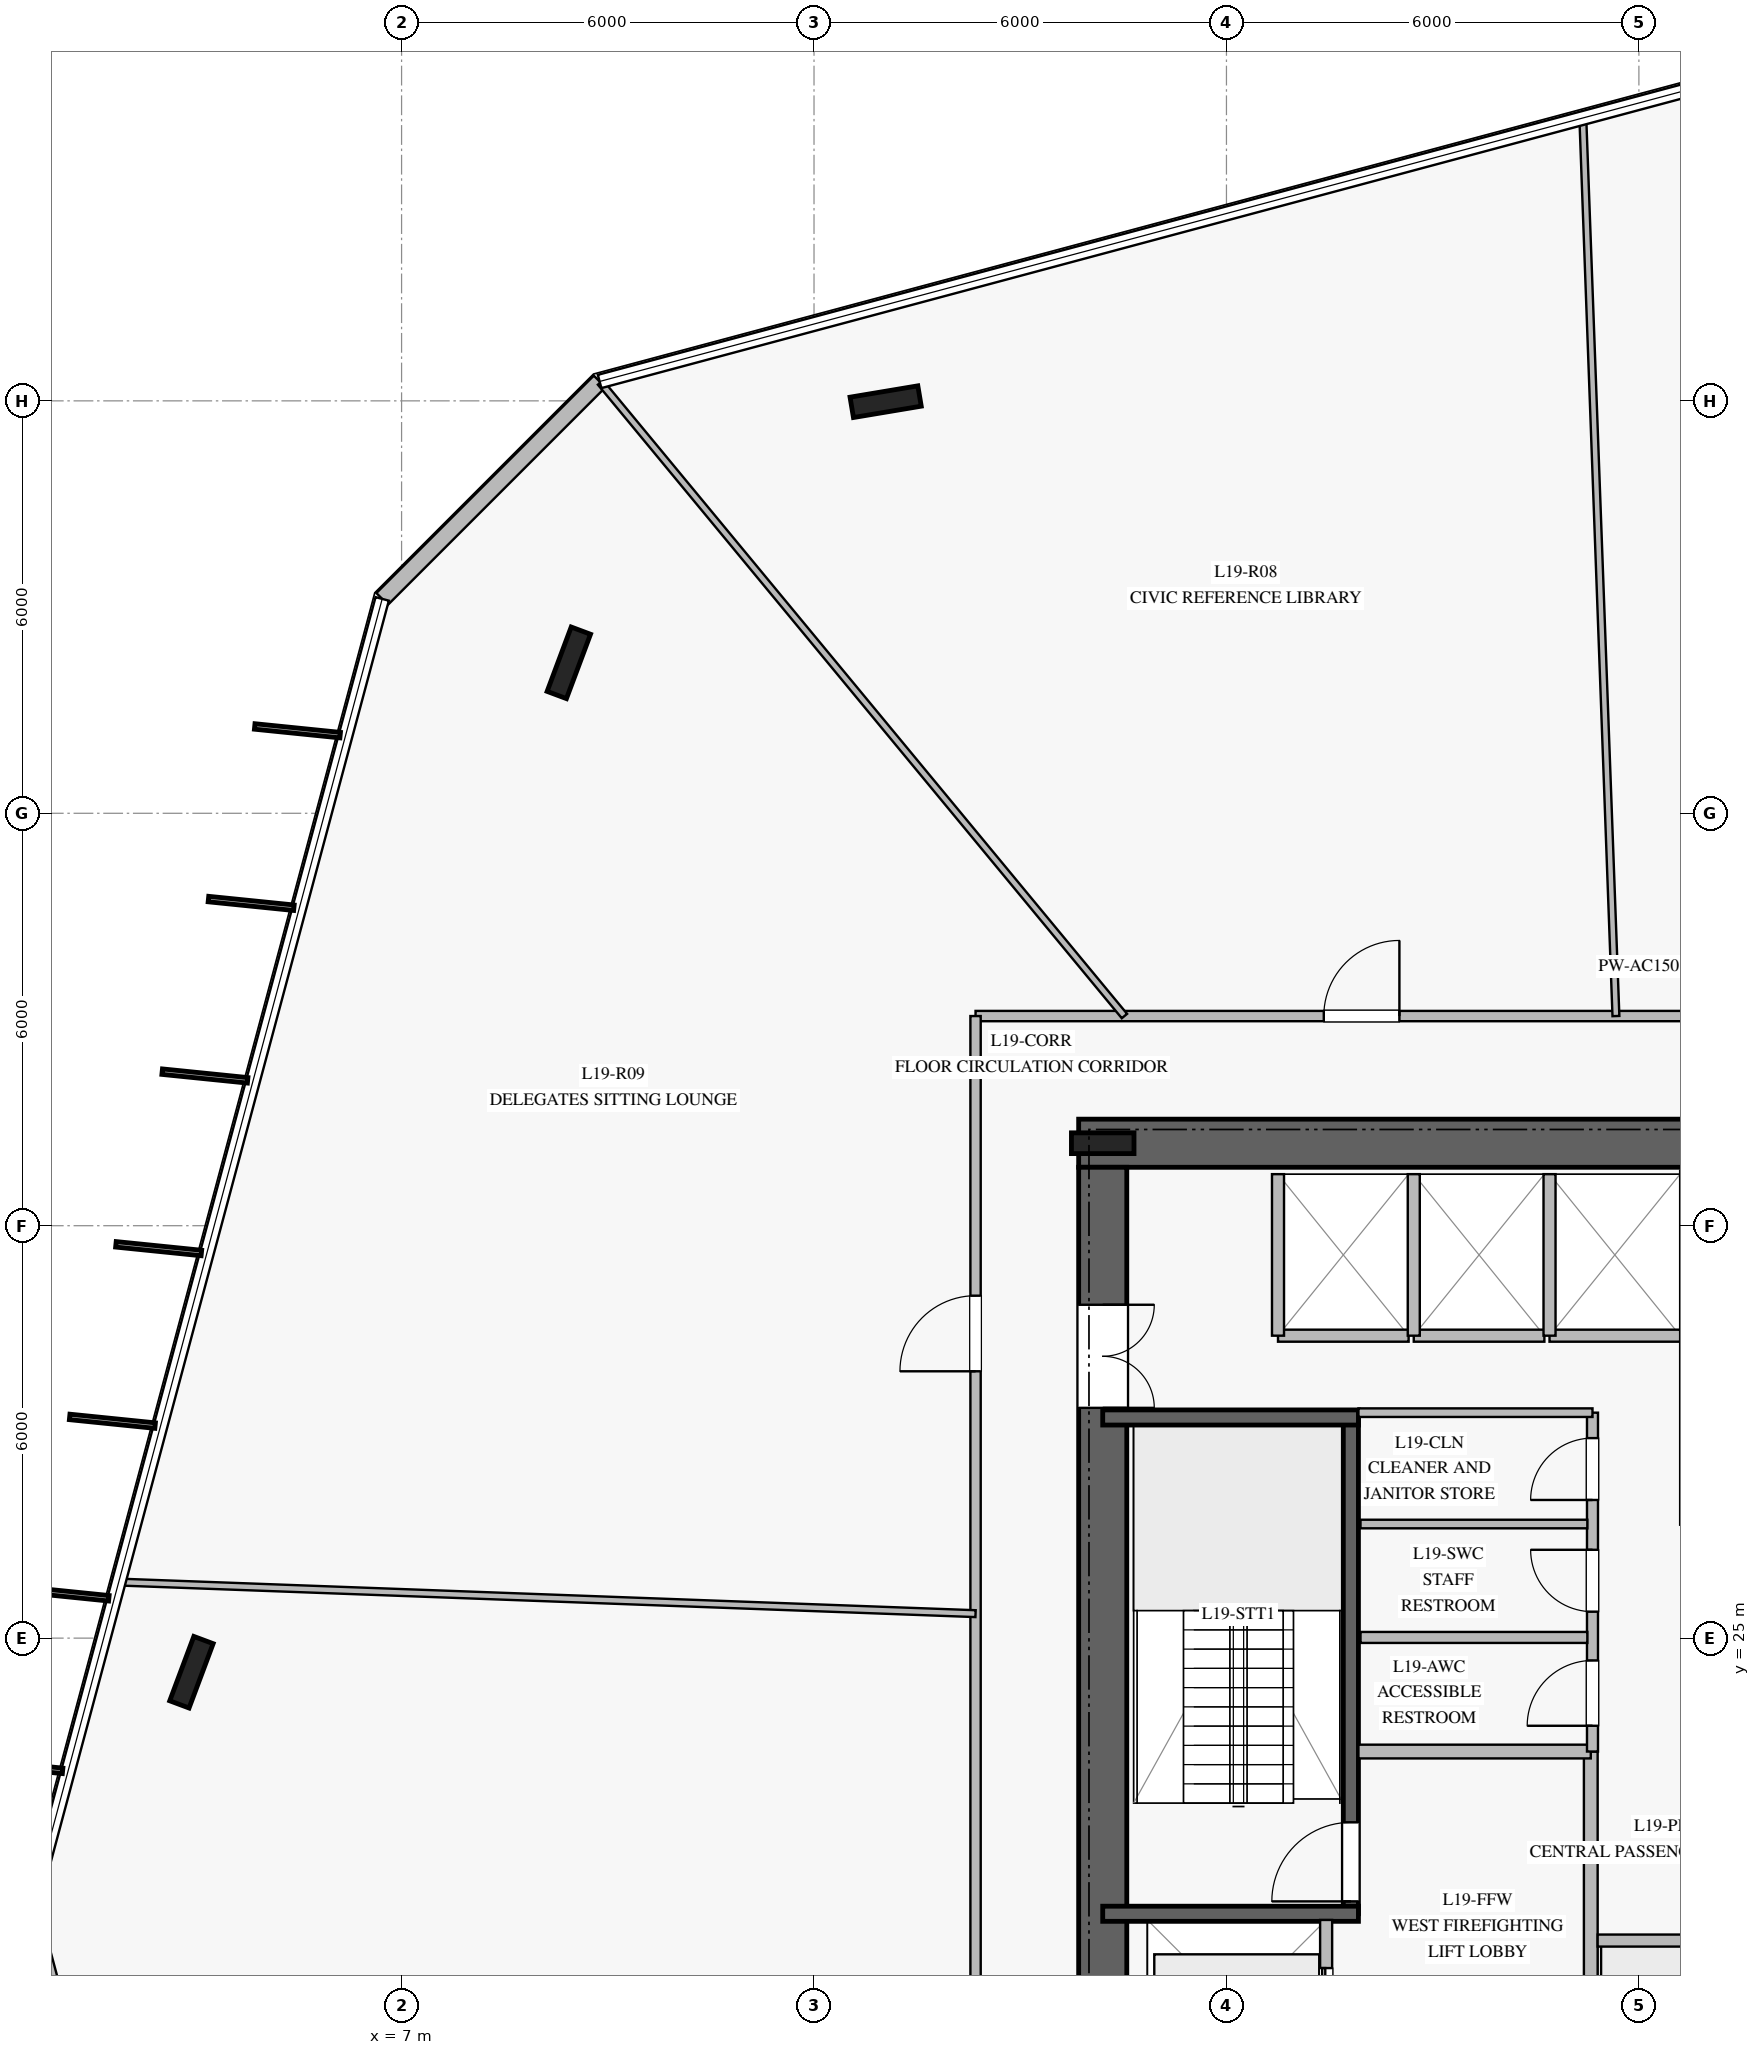
"""IFC4 building model, lengths in metres.
Left out: names, types, materials, properties, quantities, classifications, styles, units other than length and angle.
Written with IfcOpenShell. Run it as: python <this file> out.ifc"""

import sys

from ifc_helpers import new_model, si_unit, direction, frame, frame_2d, origin, origin_2d, place, context, subcontext, project, spatial, rectangle, i_section, extrude, element, fill, save


model = new_model("IFC4")
c1 = context("Model", 3, precision=1e-05, world=origin(), true_north=direction((0.0, 1.0)))
c2 = subcontext(c1, "Body", "Model", "MODEL_VIEW")
j1 = project(units=[si_unit("LENGTHUNIT", "METRE"), si_unit("PLANEANGLEUNIT", "RADIAN")], contexts=[c1])
p1 = place(None, origin())
s1 = spatial("IfcSite", under=j1, at=p1, CompositionType="ELEMENT")
p2 = place(p1, origin())
s2 = spatial("IfcBuilding", under=s1, at=p2, CompositionType="ELEMENT")
p3 = place(p2, frame((0.0, 0.0, 80.0)))
s3 = spatial("IfcBuildingStorey", under=s2, at=p3, CompositionType="ELEMENT", Elevation=80.0)
p4 = place(p3, frame((33.15, 32.2, 0.0), z_axis=(0.0, 0.0, 1.0), x_axis=(-1.0, 0.0, 0.0)))
e1 = element("IfcWall", 1, at=p4, inside=s3, PredefinedType="SHEAR", context=c2, shape_type="SweptSolid", body=[
    extrude(rectangle(XDim=16.3, YDim=0.7, at=frame_2d((8.15, 0.0))), origin(), (0.0, 0.0, 1.0), 3.76),
])
p5 = place(p4, frame((5.1, 0.0, 0.0)))
e2 = element("IfcOpeningElement", 2, at=p5, cuts=e1, PredefinedType="OPENING", context=c2, shape_type="SweptSolid", body=[
    extrude(rectangle(XDim=1.2, YDim=2.25, at=frame_2d((0.6, 1.125))), frame((0.0, 0.36, 0.0), z_axis=(0.0, -1.0, 0.0), x_axis=(1.0, 0.0, 0.0)), (0.0, 0.0, 1.0), 0.72),
])
p6 = place(p3, frame((17.2, 31.85, 0.0), z_axis=(0.0, 0.0, 1.0), x_axis=(0.0, -1.0, 0.0)))
e3 = element("IfcWall", 3, at=p6, inside=s3, PredefinedType="SHEAR", context=c2, shape_type="SweptSolid", body=[
    extrude(rectangle(XDim=13.7, YDim=0.7, at=frame_2d((6.85, 0.0))), origin(), (0.0, 0.0, 1.0), 3.76),
])
p7 = place(p6, frame((2.0, 0.0, 0.0)))
e4 = element("IfcOpeningElement", 4, at=p7, cuts=e3, PredefinedType="OPENING", context=c2, shape_type="SweptSolid", body=[
    extrude(rectangle(XDim=1.5, YDim=2.2, at=frame_2d((0.75, 1.1))), frame((0.0, 0.36, 0.0), z_axis=(0.0, -1.0, 0.0), x_axis=(1.0, 0.0, 0.0)), (0.0, 0.0, 1.0), 0.72),
])
p8 = place(p3, frame((17.2, 32.2, 0.0), z_axis=(0.0, 0.0, 1.0), x_axis=(1.0, 0.0, 0.0)))
e5 = element("IfcColumn", 5, at=p8, inside=s3, PredefinedType="COLUMN", context=c2, shape_type="SweptSolid", body=[
    extrude(i_section(OverallWidth=0.302, OverallDepth=0.91, WebThickness=0.021, FlangeThickness=0.04, at=origin_2d()), origin(), (0.0, 0.0, 1.0), 4.0),
])
p9 = place(p3, frame((20.81, 20.99, 0.0), z_axis=(0.0, 0.0, 1.0), x_axis=(0.0, 1.0, 0.0)))
e6 = element("IfcWall", 6, at=p9, inside=s3, PredefinedType="SOLIDWALL", context=c2, shape_type="SweptSolid", body=[
    extrude(rectangle(XDim=7.22, YDim=0.22, at=frame_2d((3.61, 0.0))), origin(), (0.0, 0.0, 1.0), 3.76),
])
p10 = place(p9, frame((0.18, 0.0, 0.0)))
e7 = element("IfcOpeningElement", 7, at=p10, cuts=e6, PredefinedType="OPENING", context=c2, shape_type="SweptSolid", body=[
    extrude(rectangle(XDim=1.15, YDim=2.2, at=frame_2d((0.575, 1.1))), frame((0.0, 0.12, 0.0), z_axis=(0.0, -1.0, 0.0), x_axis=(1.0, 0.0, 0.0)), (0.0, 0.0, 1.0), 0.24),
])
for number, where, z_axis, x_axis in (
    (8, (17.2, 20.99, 0.0), (0.0, 0.0, 1.0), (1.0, 0.0, 0.0)),
    (9, (17.2, 28.21, 0.0), (0.0, 0.0, 1.0), (1.0, 0.0, 0.0)),
):
    element("IfcWall", number, at=place(p3, frame(where, z_axis=z_axis, x_axis=x_axis)), inside=s3, PredefinedType="SOLIDWALL", context=c2, shape_type="SweptSolid", body=[
        extrude(rectangle(XDim=3.72, YDim=0.22, at=frame_2d((1.86, 0.0))), origin(), (0.0, 0.0, 1.0), 3.76),
    ])
for number, where, z_axis, x_axis in (
    (10, (14.042, 42.988, 0.0), (0.0, 0.0, 1.0), (0.986, 0.165, 0.0)),
    (11, (9.433, 39.189, 0.0), (0.0, 0.0, 1.0), (0.35, 0.937, 0.0)),
    (12, (3.943, 24.504, 0.0), (0.0, 0.0, 1.0), (0.35, 0.937, 0.0)),
):
    element("IfcColumn", number, at=place(p3, frame(where, z_axis=z_axis, x_axis=x_axis)), inside=s3, PredefinedType="COLUMN", context=c2, shape_type="SweptSolid", body=[
        extrude(i_section(OverallWidth=0.3, OverallDepth=1.0, WebThickness=0.019, FlangeThickness=0.036, at=origin_2d()), origin(), (0.0, 0.0, 1.0), 4.0),
    ])
p11 = place(p3, frame((9.881, 43.282, 0.0), z_axis=(0.0, 0.0, 1.0), x_axis=(-0.707106781187, -0.707106781187, 0.0)))
e13 = element("IfcWall", 13, at=p11, inside=s3, PredefinedType="STANDARD", context=c2, shape_type="SweptSolid", body=[
    extrude(rectangle(XDim=4.473, YDim=0.24, at=frame_2d((2.237, 0.0))), origin(), (0.0, 0.0, 1.0), 3.76),
])
p12 = place(p3, frame((1.607, 21.047, 0.0), z_axis=(0.0, 0.0, 1.0), x_axis=(0.258902519869, -0.965903455427, 0.0)))
e14 = element("IfcWall", 14, at=p12, inside=s3, PredefinedType="STANDARD", context=c2, shape_type="SweptSolid", body=[
    extrude(rectangle(XDim=4.473, YDim=0.24, at=frame_2d((2.236, 0.0))), origin(), (0.0, 0.0, 1.0), 3.76),
])
p13 = place(p3, frame((24.3, 18.2, 0.0), z_axis=(0.0, 0.0, 1.0), x_axis=(0.0, 1.0, 0.0)))
e15 = element("IfcWall", 15, at=p13, inside=s3, PredefinedType="PARTITIONING", context=c2, shape_type="SweptSolid", body=[
    extrude(rectangle(XDim=5.15, YDim=0.2, at=frame_2d((2.575, 0.0))), origin(), (0.0, 0.0, 1.0), 3.76),
])
p14 = place(p3, frame((20.92, 23.35, 0.0), z_axis=(0.0, 0.0, 1.0), x_axis=(1.0, 0.0, 0.0)))
e16 = element("IfcWall", 16, at=p14, inside=s3, PredefinedType="PARTITIONING", context=c2, shape_type="SweptSolid", body=[
    extrude(rectangle(XDim=3.38, YDim=0.2, at=frame_2d((1.69, 0.0))), origin(), (0.0, 0.0, 1.0), 3.76),
])
p15 = place(p3, frame((24.325, 23.35, 0.0), z_axis=(0.0, 0.0, 1.0), x_axis=(0.0, 1.0, 0.0)))
e17 = element("IfcWall", 17, at=p15, inside=s3, PredefinedType="PLUMBINGWALL", context=c2, shape_type="SweptSolid", body=[
    extrude(rectangle(XDim=4.93, YDim=0.16, at=frame_2d((2.465, 0.0))), origin(), (0.0, 0.0, 1.0), 3.76),
])
p16 = place(p15, frame((0.375, 0.0, 0.0)))
e18 = element("IfcOpeningElement", 18, at=p16, cuts=e17, PredefinedType="OPENING", context=c2, shape_type="SweptSolid", body=[
    extrude(rectangle(XDim=0.95, YDim=2.1, at=frame_2d((0.475, 1.05))), frame((0.0, 0.09, 0.0), z_axis=(0.0, -1.0, 0.0), x_axis=(1.0, 0.0, 0.0)), (0.0, 0.0, 1.0), 0.18),
])
p17 = place(p15, frame((2.035, 0.0, 0.0)))
e19 = element("IfcOpeningElement", 19, at=p17, cuts=e17, PredefinedType="OPENING", context=c2, shape_type="SweptSolid", body=[
    extrude(rectangle(XDim=0.9, YDim=2.1, at=frame_2d((0.45, 1.05))), frame((0.0, 0.09, 0.0), z_axis=(0.0, -1.0, 0.0), x_axis=(1.0, 0.0, 0.0)), (0.0, 0.0, 1.0), 0.18),
])
p18 = place(p15, frame((3.66, 0.0, 0.0)))
e20 = element("IfcOpeningElement", 20, at=p18, cuts=e17, PredefinedType="OPENING", context=c2, shape_type="SweptSolid", body=[
    extrude(rectangle(XDim=0.9, YDim=2.1, at=frame_2d((0.45, 1.05))), frame((0.0, 0.09, 0.0), z_axis=(0.0, -1.0, 0.0), x_axis=(1.0, 0.0, 0.0)), (0.0, 0.0, 1.0), 0.18),
])
p19 = place(p3, frame((20.92, 28.28, 0.0), z_axis=(0.0, 0.0, 1.0), x_axis=(1.0, 0.0, 0.0)))
e21 = element("IfcWall", 21, at=p19, inside=s3, PredefinedType="PARTITIONING", context=c2, shape_type="SweptSolid", body=[
    extrude(rectangle(XDim=3.405, YDim=0.125, at=frame_2d((1.703, 0.0))), origin(), (0.0, 0.0, 1.0), 3.76),
])
p20 = place(p3, frame((20.95, 25.01, 0.0), z_axis=(0.0, 0.0, 1.0), x_axis=(1.0, 0.0, 0.0)))
e22 = element("IfcWall", 22, at=p20, inside=s3, PredefinedType="PLUMBINGWALL", context=c2, shape_type="SweptSolid", body=[
    extrude(rectangle(XDim=3.3, YDim=0.16, at=frame_2d((1.65, 0.0))), origin(), (0.0, 0.0, 1.0), 3.76),
])
p21 = place(p3, frame((20.95, 26.66, 0.0), z_axis=(0.0, 0.0, 1.0), x_axis=(1.0, 0.0, 0.0)))
e23 = element("IfcWall", 23, at=p21, inside=s3, PredefinedType="PARTITIONING", context=c2, shape_type="SweptSolid", body=[
    extrude(rectangle(XDim=3.3, YDim=0.125, at=frame_2d((1.65, 0.0))), origin(), (0.0, 0.0, 1.0), 3.76),
])
p22 = place(p3, frame((24.4, 20.6, 0.0), z_axis=(0.0, 0.0, 1.0), x_axis=(1.0, 0.0, 0.0)))
e24 = element("IfcWall", 24, at=p22, inside=s3, PredefinedType="PARTITIONING", context=c2, shape_type="SweptSolid", body=[
    extrude(rectangle(XDim=1.9, YDim=0.175, at=frame_2d((0.95, 0.0))), origin(), (0.0, 0.0, 1.0), 3.76),
])
p23 = place(p3, frame((19.75, 29.4, 0.0), z_axis=(0.0, 0.0, 1.0), x_axis=(1.0, 0.0, 0.0)))
e25 = element("IfcWall", 25, at=p23, inside=s3, PredefinedType="PARTITIONING", context=c2, shape_type="SweptSolid", body=[
    extrude(rectangle(XDim=1.9, YDim=0.175, at=frame_2d((0.95, 0.0))), origin(), (0.0, 0.0, 1.0), 3.76),
])
p24 = place(p3, frame((19.75, 29.4, 0.0), z_axis=(0.0, 0.0, 1.0), x_axis=(0.0, 1.0, 0.0)))
e26 = element("IfcWall", 26, at=p24, inside=s3, PredefinedType="PARTITIONING", context=c2, shape_type="SweptSolid", body=[
    extrude(rectangle(XDim=2.35, YDim=0.175, at=frame_2d((1.175, 0.0))), origin(), (0.0, 0.0, 1.0), 3.76),
])
p25 = place(p3, frame((21.725, 29.4, 0.0), z_axis=(0.0, 0.0, 1.0), x_axis=(1.0, 0.0, 0.0)))
e27 = element("IfcWall", 27, at=p25, inside=s3, PredefinedType="PARTITIONING", context=c2, shape_type="SweptSolid", body=[
    extrude(rectangle(XDim=1.9, YDim=0.175, at=frame_2d((0.95, 0.0))), origin(), (0.0, 0.0, 1.0), 3.76),
])
p26 = place(p3, frame((21.725, 29.4, 0.0), z_axis=(0.0, 0.0, 1.0), x_axis=(0.0, 1.0, 0.0)))
e28 = element("IfcWall", 28, at=p26, inside=s3, PredefinedType="PARTITIONING", context=c2, shape_type="SweptSolid", body=[
    extrude(rectangle(XDim=2.35, YDim=0.175, at=frame_2d((1.175, 0.0))), origin(), (0.0, 0.0, 1.0), 3.76),
])
p27 = place(p3, frame((23.7, 29.4, 0.0), z_axis=(0.0, 0.0, 1.0), x_axis=(1.0, 0.0, 0.0)))
e29 = element("IfcWall", 29, at=p27, inside=s3, PredefinedType="PARTITIONING", context=c2, shape_type="SweptSolid", body=[
    extrude(rectangle(XDim=1.9, YDim=0.175, at=frame_2d((0.95, 0.0))), origin(), (0.0, 0.0, 1.0), 3.76),
])
p28 = place(p3, frame((23.7, 29.4, 0.0), z_axis=(0.0, 0.0, 1.0), x_axis=(0.0, 1.0, 0.0)))
e30 = element("IfcWall", 30, at=p28, inside=s3, PredefinedType="PARTITIONING", context=c2, shape_type="SweptSolid", body=[
    extrude(rectangle(XDim=2.35, YDim=0.175, at=frame_2d((1.175, 0.0))), origin(), (0.0, 0.0, 1.0), 3.76),
])
p29 = place(p3, frame((20.45, 18.3, 0.0), z_axis=(0.0, 0.0, 1.0), x_axis=(0.0, 1.0, 0.0)))
e31 = element("IfcWall", 31, at=p29, inside=s3, PredefinedType="PARTITIONING", context=c2, shape_type="SweptSolid", body=[
    extrude(rectangle(XDim=2.6, YDim=0.175, at=frame_2d((1.3, 0.0))), origin(), (0.0, 0.0, 1.0), 3.76),
])
p30 = place(p29, frame((0.7, 0.0, 0.0)))
e32 = element("IfcOpeningElement", 32, at=p30, cuts=e31, PredefinedType="OPENING", context=c2, shape_type="SweptSolid", body=[
    extrude(rectangle(XDim=1.2, YDim=2.2, at=frame_2d((0.6, 1.1))), frame((0.0, 0.098, 0.0), z_axis=(0.0, -1.0, 0.0), x_axis=(1.0, 0.0, 0.0)), (0.0, 0.0, 1.0), 0.195),
])
p31 = place(p3, frame((15.35, 34.05, 0.0), z_axis=(0.0, 0.0, 1.0), x_axis=(1.0, 0.0, 0.0)))
e33 = element("IfcWall", 33, at=p31, inside=s3, PredefinedType="PARTITIONING", context=c2, shape_type="SweptSolid", body=[
    extrude(rectangle(XDim=19.3, YDim=0.15, at=frame_2d((9.65, 0.0))), origin(), (0.0, 0.0, 1.0), 3.21),
])
p32 = place(p31, frame((13.573, 0.0, 0.0)))
e34 = element("IfcOpeningElement", 34, at=p32, cuts=e33, PredefinedType="OPENING", context=c2, shape_type="SweptSolid", body=[
    extrude(rectangle(XDim=1.1, YDim=2.2, at=frame_2d((0.55, 1.1))), frame((0.0, 0.085, 0.0), z_axis=(0.0, -1.0, 0.0), x_axis=(1.0, 0.0, 0.0)), (0.0, 0.0, 1.0), 0.17),
])
p33 = place(p31, frame((5.066, 0.0, 0.0)))
e35 = element("IfcOpeningElement", 35, at=p33, cuts=e33, PredefinedType="OPENING", context=c2, shape_type="SweptSolid", body=[
    extrude(rectangle(XDim=1.1, YDim=2.2, at=frame_2d((0.55, 1.1))), frame((0.0, 0.085, 0.0), z_axis=(0.0, -1.0, 0.0), x_axis=(1.0, 0.0, 0.0)), (0.0, 0.0, 1.0), 0.17),
])
p34 = place(p3, frame((15.35, 15.95, 0.0), z_axis=(0.0, 0.0, 1.0), x_axis=(0.0, 1.0, 0.0)))
e36 = element("IfcWall", 36, at=p34, inside=s3, PredefinedType="PARTITIONING", context=c2, shape_type="SweptSolid", body=[
    extrude(rectangle(XDim=18.1, YDim=0.15, at=frame_2d((9.05, 0.0))), origin(), (0.0, 0.0, 1.0), 3.21),
])
p35 = place(p34, frame((12.932, 0.0, 0.0)))
e37 = element("IfcOpeningElement", 37, at=p35, cuts=e36, PredefinedType="OPENING", context=c2, shape_type="SweptSolid", body=[
    extrude(rectangle(XDim=1.1, YDim=2.2, at=frame_2d((0.55, 1.1))), frame((0.0, 0.085, 0.0), z_axis=(0.0, -1.0, 0.0), x_axis=(1.0, 0.0, 0.0)), (0.0, 0.0, 1.0), 0.17),
])
p36 = place(p3, frame((24.666, 34.05, 0.0), z_axis=(0.0, 0.0, 1.0), x_axis=(-0.03683875017, 0.999321222874, 0.0)))
e38 = element("IfcWall", 38, at=p36, inside=s3, PredefinedType="MOVABLE", context=c2, shape_type="SweptSolid", body=[
    extrude(rectangle(XDim=13.056, YDim=0.1, at=frame_2d((6.528, 0.0))), origin(), (0.0, 0.0, 1.0), 3.06),
])
p37 = place(p3, frame((17.516, 34.05, 0.0), z_axis=(0.0, 0.0, 1.0), x_axis=(-0.637278580746, 0.770633512457, 0.0)))
e39 = element("IfcWall", 39, at=p37, inside=s3, PredefinedType="MOVABLE", context=c2, shape_type="SweptSolid", body=[
    extrude(rectangle(XDim=11.96, YDim=0.1, at=frame_2d((5.98, 0.0))), origin(), (0.0, 0.0, 1.0), 3.06),
])
p38 = place(p3, frame((15.35, 25.356, 0.0), z_axis=(0.0, 0.0, 1.0), x_axis=(-0.99932080841, 0.036849991562, 0.0)))
e40 = element("IfcWall", 40, at=p38, inside=s3, PredefinedType="MOVABLE", context=c2, shape_type="SweptSolid", body=[
    extrude(rectangle(XDim=12.456, YDim=0.1, at=frame_2d((6.228, 0.0))), origin(), (0.0, 0.0, 1.0), 3.02),
])
p39 = place(p10, origin())
e41 = element("IfcDoor", 41, at=p39, inside=s3, OperationType="SINGLE_SWING_LEFT", PredefinedType="DOOR", context=c2, shape_type="SweptSolid", body=[
    extrude(rectangle(XDim=1.15, YDim=2.2, at=frame_2d((0.575, 1.1))), frame((0.0, 0.025, 0.0), z_axis=(0.0, -1.0, 0.0), x_axis=(1.0, 0.0, 0.0)), (0.0, 0.0, 1.0), 0.05),
])
fill(e7, e41)
p40 = place(p7, origin())
e42 = element("IfcDoor", 42, at=p40, inside=s3, OperationType="DOUBLE_DOOR_SINGLE_SWING", PredefinedType="DOOR", context=c2, shape_type="SweptSolid", body=[
    extrude(rectangle(XDim=1.5, YDim=2.2, at=frame_2d((0.75, 1.1))), frame((0.0, 0.025, 0.0), z_axis=(0.0, -1.0, 0.0), x_axis=(1.0, 0.0, 0.0)), (0.0, 0.0, 1.0), 0.05),
])
fill(e4, e42)
p41 = place(p16, origin())
e43 = element("IfcDoor", 43, at=p41, inside=s3, OperationType="SINGLE_SWING_LEFT", PredefinedType="DOOR", context=c2, shape_type="SweptSolid", body=[
    extrude(rectangle(XDim=0.95, YDim=2.1, at=frame_2d((0.475, 1.05))), frame((0.0, 0.025, 0.0), z_axis=(0.0, -1.0, 0.0), x_axis=(1.0, 0.0, 0.0)), (0.0, 0.0, 1.0), 0.05),
])
fill(e18, e43)
p42 = place(p17, origin())
e44 = element("IfcDoor", 44, at=p42, inside=s3, OperationType="SINGLE_SWING_RIGHT", PredefinedType="DOOR", context=c2, shape_type="SweptSolid", body=[
    extrude(rectangle(XDim=0.9, YDim=2.1, at=frame_2d((0.45, 1.05))), frame((0.0, 0.025, 0.0), z_axis=(0.0, -1.0, 0.0), x_axis=(1.0, 0.0, 0.0)), (0.0, 0.0, 1.0), 0.05),
])
fill(e19, e44)
p43 = place(p18, origin())
e45 = element("IfcDoor", 45, at=p43, inside=s3, OperationType="SINGLE_SWING_LEFT", PredefinedType="DOOR", context=c2, shape_type="SweptSolid", body=[
    extrude(rectangle(XDim=0.9, YDim=2.1, at=frame_2d((0.45, 1.05))), frame((0.0, 0.025, 0.0), z_axis=(0.0, -1.0, 0.0), x_axis=(1.0, 0.0, 0.0)), (0.0, 0.0, 1.0), 0.05),
])
fill(e20, e45)
p44 = place(p30, origin())
e46 = element("IfcDoor", 46, at=p44, inside=s3, OperationType="DOUBLE_DOOR_SLIDING", PredefinedType="DOOR", context=c2, shape_type="SweptSolid", body=[
    extrude(rectangle(XDim=1.2, YDim=2.2, at=frame_2d((0.6, 1.1))), frame((0.0, 0.025, 0.0), z_axis=(0.0, -1.0, 0.0), x_axis=(1.0, 0.0, 0.0)), (0.0, 0.0, 1.0), 0.05),
])
fill(e32, e46)
p45 = place(p33, origin())
e47 = element("IfcDoor", 47, at=p45, inside=s3, OperationType="SINGLE_SWING_RIGHT", PredefinedType="DOOR", context=c2, shape_type="SweptSolid", body=[
    extrude(rectangle(XDim=1.1, YDim=2.2, at=frame_2d((0.55, 1.1))), frame((0.0, 0.025, 0.0), z_axis=(0.0, -1.0, 0.0), x_axis=(1.0, 0.0, 0.0)), (0.0, 0.0, 1.0), 0.05),
])
fill(e35, e47)
p46 = place(p35, origin())
e48 = element("IfcDoor", 48, at=p46, inside=s3, OperationType="SINGLE_SWING_LEFT", PredefinedType="DOOR", context=c2, shape_type="SweptSolid", body=[
    extrude(rectangle(XDim=1.1, YDim=2.2, at=frame_2d((0.55, 1.1))), frame((0.0, 0.025, 0.0), z_axis=(0.0, -1.0, 0.0), x_axis=(1.0, 0.0, 0.0)), (0.0, 0.0, 1.0), 0.05),
])
fill(e37, e48)
save(model, sys.argv[1])
